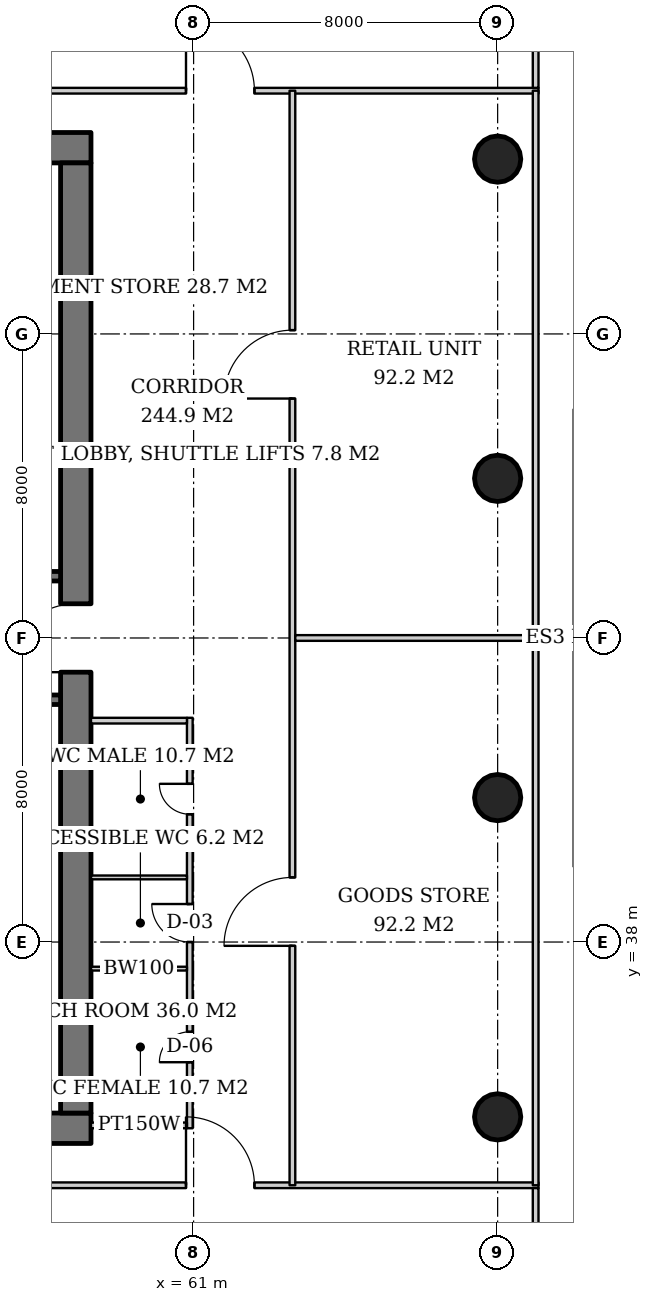
"""IFC4 building model, lengths in metres.
Left out: names, types, materials, properties, quantities, classifications, styles, units other than length and angle.
Written with IfcOpenShell. Run it as: python <this file> out.ifc"""

import sys

from ifc_helpers import new_model, si_unit, direction, frame, frame_2d, origin, origin_2d, place, context, subcontext, project, spatial, rectangle, hollow_circle, extrude, element, fill, save


model = new_model("IFC4")
c1 = context("Model", 3, precision=1e-05, world=origin(), true_north=direction((0.0, 1.0)))
c2 = subcontext(c1, "Body", "Model", "MODEL_VIEW")
j1 = project(units=[si_unit("LENGTHUNIT", "METRE"), si_unit("PLANEANGLEUNIT", "RADIAN")], contexts=[c1])
p1 = place(None, origin())
s1 = spatial("IfcSite", under=j1, at=p1, CompositionType="ELEMENT")
p2 = place(p1, origin())
s2 = spatial("IfcBuilding", under=s1, at=p2, CompositionType="ELEMENT")
p3 = place(p2, frame((0.0, 0.0, 6.0)))
s3 = spatial("IfcBuildingStorey", under=s2, at=p3, CompositionType="ELEMENT", Elevation=6.0)
for number, where, z_axis, x_axis in (
    (1, (69.0, 33.4, 0.0), (0.0, 0.0, 1.0), (1.0, 0.0, 0.0)),
    (2, (69.0, 41.8, 0.0), (0.0, 0.0, 1.0), (1.0, 0.0, 0.0)),
    (3, (69.0, 50.2, 0.0), (0.0, 0.0, 1.0), (1.0, 0.0, 0.0)),
    (4, (69.0, 58.6, 0.0), (0.0, 0.0, 1.0), (1.0, 0.0, 0.0)),
):
    element("IfcColumn", number, at=place(p3, frame(where, z_axis=z_axis, x_axis=x_axis)), inside=s3, PredefinedType="COLUMN", context=c2, shape_type="SweptSolid", body=[
        extrude(hollow_circle(Radius=0.61, WallThickness=0.04, at=origin_2d()), origin(), (0.0, 0.0, 1.0), 5.0),
    ])
p4 = place(p3, frame((31.7, 33.1, 0.0), z_axis=(0.0, 0.0, 1.0), x_axis=(1.0, 0.0, 0.0)))
e5 = element("IfcWall", 5, at=p4, inside=s3, PredefinedType="SHEAR", context=c2, shape_type="SweptSolid", body=[
    extrude(rectangle(XDim=26.6, YDim=0.8, at=frame_2d((13.3, 0.0))), origin(), (0.0, 0.0, 1.0), 5.0),
])
p5 = place(p4, frame((7.3, 0.0, 0.0)))
e6 = element("IfcOpeningElement", 6, at=p5, cuts=e5, PredefinedType="OPENING", context=c2, shape_type="SweptSolid", body=[
    extrude(rectangle(XDim=1.0, YDim=2.1, at=frame_2d((0.5, 1.05))), frame((0.0, 0.41, 0.0), z_axis=(0.0, -1.0, 0.0), x_axis=(1.0, 0.0, 0.0)), (0.0, 0.0, 1.0), 0.82),
])
p6 = place(p4, frame((18.75, 0.0, 0.0)))
e7 = element("IfcOpeningElement", 7, at=p6, cuts=e5, PredefinedType="OPENING", context=c2, shape_type="SweptSolid", body=[
    extrude(rectangle(XDim=1.0, YDim=2.1, at=frame_2d((0.5, 1.05))), frame((0.0, 0.41, 0.0), z_axis=(0.0, -1.0, 0.0), x_axis=(1.0, 0.0, 0.0)), (0.0, 0.0, 1.0), 0.82),
])
p7 = place(p4, frame((3.25, 0.0, 0.0)))
e8 = element("IfcOpeningElement", 8, at=p7, cuts=e5, PredefinedType="OPENING", context=c2, shape_type="SweptSolid", body=[
    extrude(rectangle(XDim=1.0, YDim=2.1, at=frame_2d((0.5, 1.05))), frame((0.0, 0.41, 0.0), z_axis=(0.0, -1.0, 0.0), x_axis=(1.0, 0.0, 0.0)), (0.0, 0.0, 1.0), 0.82),
])
p8 = place(p4, frame((10.42, 0.0, 0.0)))
e9 = element("IfcOpeningElement", 9, at=p8, cuts=e5, PredefinedType="OPENING", context=c2, shape_type="SweptSolid", body=[
    extrude(rectangle(XDim=1.0, YDim=2.1, at=frame_2d((0.5, 1.05))), frame((0.0, 0.41, 0.0), z_axis=(0.0, -1.0, 0.0), x_axis=(1.0, 0.0, 0.0)), (0.0, 0.0, 1.0), 0.82),
])
p9 = place(p4, frame((14.46, 0.0, 0.0)))
e10 = element("IfcOpeningElement", 10, at=p9, cuts=e5, PredefinedType="OPENING", context=c2, shape_type="SweptSolid", body=[
    extrude(rectangle(XDim=1.0, YDim=2.1, at=frame_2d((0.5, 1.05))), frame((0.0, 0.41, 0.0), z_axis=(0.0, -1.0, 0.0), x_axis=(1.0, 0.0, 0.0)), (0.0, 0.0, 1.0), 0.82),
])
p10 = place(p4, frame((22.45, 0.0, 0.0)))
e11 = element("IfcOpeningElement", 11, at=p10, cuts=e5, PredefinedType="OPENING", context=c2, shape_type="SweptSolid", body=[
    extrude(rectangle(XDim=1.0, YDim=2.1, at=frame_2d((0.5, 1.05))), frame((0.0, 0.41, 0.0), z_axis=(0.0, -1.0, 0.0), x_axis=(1.0, 0.0, 0.0)), (0.0, 0.0, 1.0), 0.82),
])
p11 = place(p3, frame((31.7, 58.9, 0.0), z_axis=(0.0, 0.0, 1.0), x_axis=(1.0, 0.0, 0.0)))
e12 = element("IfcWall", 12, at=p11, inside=s3, PredefinedType="SHEAR", context=c2, shape_type="SweptSolid", body=[
    extrude(rectangle(XDim=26.6, YDim=0.8, at=frame_2d((13.3, 0.0))), origin(), (0.0, 0.0, 1.0), 5.0),
])
p12 = place(p11, frame((17.94, 0.0, 0.0)))
e13 = element("IfcOpeningElement", 13, at=p12, cuts=e12, PredefinedType="OPENING", context=c2, shape_type="SweptSolid", body=[
    extrude(rectangle(XDim=1.0, YDim=2.1, at=frame_2d((0.5, 1.05))), frame((0.0, 0.41, 0.0), z_axis=(0.0, -1.0, 0.0), x_axis=(1.0, 0.0, 0.0)), (0.0, 0.0, 1.0), 0.82),
])
p13 = place(p11, frame((12.44, 0.0, 0.0)))
e14 = element("IfcOpeningElement", 14, at=p13, cuts=e12, PredefinedType="OPENING", context=c2, shape_type="SweptSolid", body=[
    extrude(rectangle(XDim=1.0, YDim=2.1, at=frame_2d((0.5, 1.05))), frame((0.0, 0.41, 0.0), z_axis=(0.0, -1.0, 0.0), x_axis=(1.0, 0.0, 0.0)), (0.0, 0.0, 1.0), 0.82),
])
p14 = place(p11, frame((5.825, 0.0, 0.0)))
e15 = element("IfcOpeningElement", 15, at=p14, cuts=e12, PredefinedType="OPENING", context=c2, shape_type="SweptSolid", body=[
    extrude(rectangle(XDim=1.0, YDim=2.1, at=frame_2d((0.5, 1.05))), frame((0.0, 0.41, 0.0), z_axis=(0.0, -1.0, 0.0), x_axis=(1.0, 0.0, 0.0)), (0.0, 0.0, 1.0), 0.82),
])
p15 = place(p11, frame((1.139, 0.0, 0.0)))
e16 = element("IfcOpeningElement", 16, at=p15, cuts=e12, PredefinedType="OPENING", context=c2, shape_type="SweptSolid", body=[
    extrude(rectangle(XDim=1.0, YDim=2.1, at=frame_2d((0.5, 1.05))), frame((0.0, 0.41, 0.0), z_axis=(0.0, -1.0, 0.0), x_axis=(1.0, 0.0, 0.0)), (0.0, 0.0, 1.0), 0.82),
])
p16 = place(p11, frame((2.661, 0.0, 0.0)))
e17 = element("IfcOpeningElement", 17, at=p16, cuts=e12, PredefinedType="OPENING", context=c2, shape_type="SweptSolid", body=[
    extrude(rectangle(XDim=1.0, YDim=2.1, at=frame_2d((0.5, 1.05))), frame((0.0, 0.41, 0.0), z_axis=(0.0, -1.0, 0.0), x_axis=(1.0, 0.0, 0.0)), (0.0, 0.0, 1.0), 0.82),
])
p17 = place(p11, frame((4.204, 0.0, 0.0)))
e18 = element("IfcOpeningElement", 18, at=p17, cuts=e12, PredefinedType="OPENING", context=c2, shape_type="SweptSolid", body=[
    extrude(rectangle(XDim=1.0, YDim=2.1, at=frame_2d((0.5, 1.05))), frame((0.0, 0.41, 0.0), z_axis=(0.0, -1.0, 0.0), x_axis=(1.0, 0.0, 0.0)), (0.0, 0.0, 1.0), 0.82),
])
p18 = place(p11, frame((20.875, 0.0, 0.0)))
e19 = element("IfcOpeningElement", 19, at=p18, cuts=e12, PredefinedType="OPENING", context=c2, shape_type="SweptSolid", body=[
    extrude(rectangle(XDim=1.0, YDim=2.1, at=frame_2d((0.5, 1.05))), frame((0.0, 0.41, 0.0), z_axis=(0.0, -1.0, 0.0), x_axis=(1.0, 0.0, 0.0)), (0.0, 0.0, 1.0), 0.82),
])
p19 = place(p11, frame((23.7, 0.0, 0.0)))
e20 = element("IfcOpeningElement", 20, at=p19, cuts=e12, PredefinedType="OPENING", context=c2, shape_type="SweptSolid", body=[
    extrude(rectangle(XDim=1.0, YDim=2.1, at=frame_2d((0.5, 1.05))), frame((0.0, 0.41, 0.0), z_axis=(0.0, -1.0, 0.0), x_axis=(1.0, 0.0, 0.0)), (0.0, 0.0, 1.0), 0.82),
])
p20 = place(p3, frame((57.9, 33.5, 0.0), z_axis=(0.0, 0.0, 1.0), x_axis=(0.0, 1.0, 0.0)))
e21 = element("IfcWall", 21, at=p20, inside=s3, PredefinedType="SHEAR", context=c2, shape_type="SweptSolid", body=[
    extrude(rectangle(XDim=25.0, YDim=0.8, at=frame_2d((12.5, 0.0))), origin(), (0.0, 0.0, 1.0), 5.0),
])
p21 = place(p20, frame((11.6, 0.0, 0.0)))
e22 = element("IfcOpeningElement", 22, at=p21, cuts=e21, PredefinedType="OPENING", context=c2, shape_type="SweptSolid", body=[
    extrude(rectangle(XDim=1.8, YDim=2.4, at=frame_2d((0.9, 1.2))), frame((0.0, 0.41, 0.0), z_axis=(0.0, -1.0, 0.0), x_axis=(1.0, 0.0, 0.0)), (0.0, 0.0, 1.0), 0.82),
])
for number, where, z_axis, x_axis in (
    (23, (54.9, 44.375, 0.0), (0.0, 0.0, 1.0), (1.0, 0.0, 0.0)),
    (24, (54.9, 47.625, 0.0), (0.0, 0.0, 1.0), (1.0, 0.0, 0.0)),
):
    element("IfcWall", number, at=place(p3, frame(where, z_axis=z_axis, x_axis=x_axis)), inside=s3, PredefinedType="SOLIDWALL", context=c2, shape_type="SweptSolid", body=[
        extrude(rectangle(XDim=2.6, YDim=0.25, at=frame_2d((1.3, 0.0))), origin(), (0.0, 0.0, 1.0), 4.7),
    ])
p22 = place(p3, frame((60.9, 33.1, 0.0), z_axis=(0.0, 0.0, 1.0), x_axis=(0.0, 1.0, 0.0)))
e25 = element("IfcWall", 25, at=p22, inside=s3, PredefinedType="PARTITIONING", context=c2, shape_type="SweptSolid", body=[
    extrude(rectangle(XDim=10.8, YDim=0.15, at=frame_2d((5.4, 0.0))), origin(), (0.0, 0.0, 1.0), 3.688),
])
p23 = place(p22, frame((1.738, 0.0, 0.0)))
e26 = element("IfcOpeningElement", 26, at=p23, cuts=e25, PredefinedType="OPENING", context=c2, shape_type="SweptSolid", body=[
    extrude(rectangle(XDim=0.8, YDim=2.1, at=frame_2d((0.4, 1.05))), frame((0.0, 0.085, 0.0), z_axis=(0.0, -1.0, 0.0), x_axis=(1.0, 0.0, 0.0)), (0.0, 0.0, 1.0), 0.17),
])
p24 = place(p22, frame((4.9, 0.0, 0.0)))
e27 = element("IfcOpeningElement", 27, at=p24, cuts=e25, PredefinedType="OPENING", context=c2, shape_type="SweptSolid", body=[
    extrude(rectangle(XDim=1.0, YDim=2.1, at=frame_2d((0.5, 1.05))), frame((0.0, 0.085, 0.0), z_axis=(0.0, -1.0, 0.0), x_axis=(1.0, 0.0, 0.0)), (0.0, 0.0, 1.0), 0.17),
])
p25 = place(p22, frame((8.262, 0.0, 0.0)))
e28 = element("IfcOpeningElement", 28, at=p25, cuts=e25, PredefinedType="OPENING", context=c2, shape_type="SweptSolid", body=[
    extrude(rectangle(XDim=0.8, YDim=2.1, at=frame_2d((0.4, 1.05))), frame((0.0, 0.085, 0.0), z_axis=(0.0, -1.0, 0.0), x_axis=(1.0, 0.0, 0.0)), (0.0, 0.0, 1.0), 0.17),
])
p26 = place(p3, frame((60.825, 33.175, 0.0), z_axis=(0.0, 0.0, 1.0), x_axis=(-1.0, 0.0, 0.0)))
e29 = element("IfcWall", 29, at=p26, inside=s3, PredefinedType="PARTITIONING", context=c2, shape_type="SweptSolid", body=[
    extrude(rectangle(XDim=2.525, YDim=0.15, at=frame_2d((1.262, 0.0))), origin(), (0.0, 0.0, 1.0), 3.688),
])
p27 = place(p3, frame((60.825, 37.3, 0.0), z_axis=(0.0, 0.0, 1.0), x_axis=(-1.0, 0.0, 0.0)))
e30 = element("IfcWall", 30, at=p27, inside=s3, PredefinedType="SOLIDWALL", context=c2, shape_type="SweptSolid", body=[
    extrude(rectangle(XDim=2.525, YDim=0.1, at=frame_2d((1.262, 0.0))), origin(), (0.0, 0.0, 1.0), 3.9),
])
p28 = place(p3, frame((60.825, 39.7, 0.0), z_axis=(0.0, 0.0, 1.0), x_axis=(-1.0, 0.0, 0.0)))
e31 = element("IfcWall", 31, at=p28, inside=s3, PredefinedType="SOLIDWALL", context=c2, shape_type="SweptSolid", body=[
    extrude(rectangle(XDim=2.525, YDim=0.1, at=frame_2d((1.262, 0.0))), origin(), (0.0, 0.0, 1.0), 4.7),
])
p29 = place(p3, frame((60.825, 43.825, 0.0), z_axis=(0.0, 0.0, 1.0), x_axis=(-1.0, 0.0, 0.0)))
e32 = element("IfcWall", 32, at=p29, inside=s3, PredefinedType="PARTITIONING", context=c2, shape_type="SweptSolid", body=[
    extrude(rectangle(XDim=2.525, YDim=0.15, at=frame_2d((1.262, 0.0))), origin(), (0.0, 0.0, 1.0), 4.7),
])
p30 = place(p3, frame((19.925, 31.6, 0.0), z_axis=(0.0, 0.0, 1.0), x_axis=(1.0, 0.0, 0.0)))
e33 = element("IfcWall", 33, at=p30, inside=s3, PredefinedType="PARTITIONING", context=c2, shape_type="SweptSolid", body=[
    extrude(rectangle(XDim=50.15, YDim=0.15, at=frame_2d((25.075, 0.0))), origin(), (0.0, 0.0, 1.0), 3.688),
])
p31 = place(p30, frame((7.475, 0.0, 0.0)))
e34 = element("IfcOpeningElement", 34, at=p31, cuts=e33, PredefinedType="OPENING", context=c2, shape_type="SweptSolid", body=[
    extrude(rectangle(XDim=1.8, YDim=2.4, at=frame_2d((0.9, 1.2))), frame((0.0, 0.085, 0.0), z_axis=(0.0, -1.0, 0.0), x_axis=(1.0, 0.0, 0.0)), (0.0, 0.0, 1.0), 0.17),
])
p32 = place(p30, frame((19.975, 0.0, 0.0)))
e35 = element("IfcOpeningElement", 35, at=p32, cuts=e33, PredefinedType="OPENING", context=c2, shape_type="SweptSolid", body=[
    extrude(rectangle(XDim=1.8, YDim=2.4, at=frame_2d((0.9, 1.2))), frame((0.0, 0.085, 0.0), z_axis=(0.0, -1.0, 0.0), x_axis=(1.0, 0.0, 0.0)), (0.0, 0.0, 1.0), 0.17),
])
p33 = place(p30, frame((28.375, 0.0, 0.0)))
e36 = element("IfcOpeningElement", 36, at=p33, cuts=e33, PredefinedType="OPENING", context=c2, shape_type="SweptSolid", body=[
    extrude(rectangle(XDim=1.8, YDim=2.4, at=frame_2d((0.9, 1.2))), frame((0.0, 0.085, 0.0), z_axis=(0.0, -1.0, 0.0), x_axis=(1.0, 0.0, 0.0)), (0.0, 0.0, 1.0), 0.17),
])
p34 = place(p30, frame((40.875, 0.0, 0.0)))
e37 = element("IfcOpeningElement", 37, at=p34, cuts=e33, PredefinedType="OPENING", context=c2, shape_type="SweptSolid", body=[
    extrude(rectangle(XDim=1.8, YDim=2.4, at=frame_2d((0.9, 1.2))), frame((0.0, 0.085, 0.0), z_axis=(0.0, -1.0, 0.0), x_axis=(1.0, 0.0, 0.0)), (0.0, 0.0, 1.0), 0.17),
])
p35 = place(p3, frame((70.0, 21.075, 0.0), z_axis=(0.0, 0.0, 1.0), x_axis=(0.0, 1.0, 0.0)))
e38 = element("IfcWall", 38, at=p35, inside=s3, PredefinedType="PARTITIONING", context=c2, shape_type="SweptSolid", body=[
    extrude(rectangle(XDim=10.45, YDim=0.15, at=frame_2d((5.225, 0.0))), origin(), (0.0, 0.0, 1.0), 4.7),
])
p36 = place(p3, frame((19.925, 60.4, 0.0), z_axis=(0.0, 0.0, 1.0), x_axis=(1.0, 0.0, 0.0)))
e39 = element("IfcWall", 39, at=p36, inside=s3, PredefinedType="PARTITIONING", context=c2, shape_type="SweptSolid", body=[
    extrude(rectangle(XDim=50.15, YDim=0.15, at=frame_2d((25.075, 0.0))), origin(), (0.0, 0.0, 1.0), 3.688),
])
p37 = place(p36, frame((7.475, 0.0, 0.0)))
e40 = element("IfcOpeningElement", 40, at=p37, cuts=e39, PredefinedType="OPENING", context=c2, shape_type="SweptSolid", body=[
    extrude(rectangle(XDim=1.8, YDim=2.4, at=frame_2d((0.9, 1.2))), frame((0.0, 0.085, 0.0), z_axis=(0.0, -1.0, 0.0), x_axis=(1.0, 0.0, 0.0)), (0.0, 0.0, 1.0), 0.17),
])
p38 = place(p36, frame((19.975, 0.0, 0.0)))
e41 = element("IfcOpeningElement", 41, at=p38, cuts=e39, PredefinedType="OPENING", context=c2, shape_type="SweptSolid", body=[
    extrude(rectangle(XDim=1.8, YDim=2.4, at=frame_2d((0.9, 1.2))), frame((0.0, 0.085, 0.0), z_axis=(0.0, -1.0, 0.0), x_axis=(1.0, 0.0, 0.0)), (0.0, 0.0, 1.0), 0.17),
])
p39 = place(p36, frame((28.375, 0.0, 0.0)))
e42 = element("IfcOpeningElement", 42, at=p39, cuts=e39, PredefinedType="OPENING", context=c2, shape_type="SweptSolid", body=[
    extrude(rectangle(XDim=1.8, YDim=2.4, at=frame_2d((0.9, 1.2))), frame((0.0, 0.085, 0.0), z_axis=(0.0, -1.0, 0.0), x_axis=(1.0, 0.0, 0.0)), (0.0, 0.0, 1.0), 0.17),
])
p40 = place(p36, frame((40.875, 0.0, 0.0)))
e43 = element("IfcOpeningElement", 43, at=p40, cuts=e39, PredefinedType="OPENING", context=c2, shape_type="SweptSolid", body=[
    extrude(rectangle(XDim=1.8, YDim=2.4, at=frame_2d((0.9, 1.2))), frame((0.0, 0.085, 0.0), z_axis=(0.0, -1.0, 0.0), x_axis=(1.0, 0.0, 0.0)), (0.0, 0.0, 1.0), 0.17),
])
p41 = place(p3, frame((70.0, 60.475, 0.0), z_axis=(0.0, 0.0, 1.0), x_axis=(0.0, 1.0, 0.0)))
e44 = element("IfcWall", 44, at=p41, inside=s3, PredefinedType="PARTITIONING", context=c2, shape_type="SweptSolid", body=[
    extrude(rectangle(XDim=10.45, YDim=0.15, at=frame_2d((5.225, 0.0))), origin(), (0.0, 0.0, 1.0), 4.7),
])
p42 = place(p3, frame((63.6, 31.6, 0.0), z_axis=(0.0, 0.0, 1.0), x_axis=(0.0, 1.0, 0.0)))
e45 = element("IfcWall", 45, at=p42, inside=s3, PredefinedType="PARTITIONING", context=c2, shape_type="SweptSolid", body=[
    extrude(rectangle(XDim=28.8, YDim=0.15, at=frame_2d((14.4, 0.0))), origin(), (0.0, 0.0, 1.0), 3.688),
])
p43 = place(p42, frame((6.3, 0.0, 0.0)))
e46 = element("IfcOpeningElement", 46, at=p43, cuts=e45, PredefinedType="OPENING", context=c2, shape_type="SweptSolid", body=[
    extrude(rectangle(XDim=1.8, YDim=2.4, at=frame_2d((0.9, 1.2))), frame((0.0, 0.085, 0.0), z_axis=(0.0, -1.0, 0.0), x_axis=(1.0, 0.0, 0.0)), (0.0, 0.0, 1.0), 0.17),
])
p44 = place(p42, frame((20.7, 0.0, 0.0)))
e47 = element("IfcOpeningElement", 47, at=p44, cuts=e45, PredefinedType="OPENING", context=c2, shape_type="SweptSolid", body=[
    extrude(rectangle(XDim=1.8, YDim=2.4, at=frame_2d((0.9, 1.2))), frame((0.0, 0.085, 0.0), z_axis=(0.0, -1.0, 0.0), x_axis=(1.0, 0.0, 0.0)), (0.0, 0.0, 1.0), 0.17),
])
p45 = place(p3, frame((70.0, 31.6, 0.0), z_axis=(0.0, 0.0, 1.0), x_axis=(0.0, 1.0, 0.0)))
e48 = element("IfcWall", 48, at=p45, inside=s3, PredefinedType="PARTITIONING", context=c2, shape_type="SweptSolid", body=[
    extrude(rectangle(XDim=28.8, YDim=0.15, at=frame_2d((14.4, 0.0))), origin(), (0.0, 0.0, 1.0), 4.7),
])
p46 = place(p3, frame((63.675, 46.0, 0.0), z_axis=(0.0, 0.0, 1.0), x_axis=(1.0, 0.0, 0.0)))
e49 = element("IfcWall", 49, at=p46, inside=s3, PredefinedType="PARTITIONING", context=c2, shape_type="SweptSolid", body=[
    extrude(rectangle(XDim=6.25, YDim=0.15, at=frame_2d((3.125, 0.0))), origin(), (0.0, 0.0, 1.0), 4.08),
])
p47 = place(p21, origin())
e50 = element("IfcDoor", 50, at=p47, inside=s3, OperationType="DOUBLE_DOOR_SINGLE_SWING", PredefinedType="DOOR", context=c2, shape_type="SweptSolid", body=[
    extrude(rectangle(XDim=1.8, YDim=2.4, at=frame_2d((0.9, 1.2))), frame((0.0, 0.025, 0.0), z_axis=(0.0, -1.0, 0.0), x_axis=(1.0, 0.0, 0.0)), (0.0, 0.0, 1.0), 0.05),
])
fill(e22, e50)
p48 = place(p23, origin())
e51 = element("IfcDoor", 51, at=p48, inside=s3, OperationType="SINGLE_SWING_LEFT", PredefinedType="DOOR", context=c2, shape_type="SweptSolid", body=[
    extrude(rectangle(XDim=0.8, YDim=2.1, at=frame_2d((0.4, 1.05))), frame((0.0, 0.025, 0.0), z_axis=(0.0, -1.0, 0.0), x_axis=(1.0, 0.0, 0.0)), (0.0, 0.0, 1.0), 0.05),
])
fill(e26, e51)
p49 = place(p24, origin())
e52 = element("IfcDoor", 52, at=p49, inside=s3, OperationType="SINGLE_SWING_RIGHT", PredefinedType="DOOR", context=c2, shape_type="SweptSolid", body=[
    extrude(rectangle(XDim=1.0, YDim=2.1, at=frame_2d((0.5, 1.05))), frame((0.0, 0.025, 0.0), z_axis=(0.0, -1.0, 0.0), x_axis=(1.0, 0.0, 0.0)), (0.0, 0.0, 1.0), 0.05),
])
fill(e27, e52)
p50 = place(p25, origin())
e53 = element("IfcDoor", 53, at=p50, inside=s3, OperationType="SINGLE_SWING_RIGHT", PredefinedType="DOOR", context=c2, shape_type="SweptSolid", body=[
    extrude(rectangle(XDim=0.8, YDim=2.1, at=frame_2d((0.4, 1.05))), frame((0.0, 0.025, 0.0), z_axis=(0.0, -1.0, 0.0), x_axis=(1.0, 0.0, 0.0)), (0.0, 0.0, 1.0), 0.05),
])
fill(e28, e53)
p51 = place(p34, origin())
e54 = element("IfcDoor", 54, at=p51, inside=s3, OperationType="DOUBLE_DOOR_SINGLE_SWING", PredefinedType="DOOR", context=c2, shape_type="SweptSolid", body=[
    extrude(rectangle(XDim=1.8, YDim=2.4, at=frame_2d((0.9, 1.2))), frame((0.0, 0.025, 0.0), z_axis=(0.0, -1.0, 0.0), x_axis=(1.0, 0.0, 0.0)), (0.0, 0.0, 1.0), 0.05),
])
fill(e37, e54)
p52 = place(p40, origin())
e55 = element("IfcDoor", 55, at=p52, inside=s3, OperationType="DOUBLE_DOOR_SINGLE_SWING", PredefinedType="DOOR", context=c2, shape_type="SweptSolid", body=[
    extrude(rectangle(XDim=1.8, YDim=2.4, at=frame_2d((0.9, 1.2))), frame((0.0, 0.025, 0.0), z_axis=(0.0, -1.0, 0.0), x_axis=(1.0, 0.0, 0.0)), (0.0, 0.0, 1.0), 0.05),
])
fill(e43, e55)
p53 = place(p43, origin())
e56 = element("IfcDoor", 56, at=p53, inside=s3, OperationType="DOUBLE_DOOR_SINGLE_SWING", PredefinedType="DOOR", context=c2, shape_type="SweptSolid", body=[
    extrude(rectangle(XDim=1.8, YDim=2.4, at=frame_2d((0.9, 1.2))), frame((0.0, 0.025, 0.0), z_axis=(0.0, -1.0, 0.0), x_axis=(1.0, 0.0, 0.0)), (0.0, 0.0, 1.0), 0.05),
])
fill(e46, e56)
p54 = place(p44, origin())
e57 = element("IfcDoor", 57, at=p54, inside=s3, OperationType="DOUBLE_DOOR_SINGLE_SWING", PredefinedType="DOOR", context=c2, shape_type="SweptSolid", body=[
    extrude(rectangle(XDim=1.8, YDim=2.4, at=frame_2d((0.9, 1.2))), frame((0.0, 0.025, 0.0), z_axis=(0.0, -1.0, 0.0), x_axis=(1.0, 0.0, 0.0)), (0.0, 0.0, 1.0), 0.05),
])
fill(e47, e57)
save(model, sys.argv[1])
